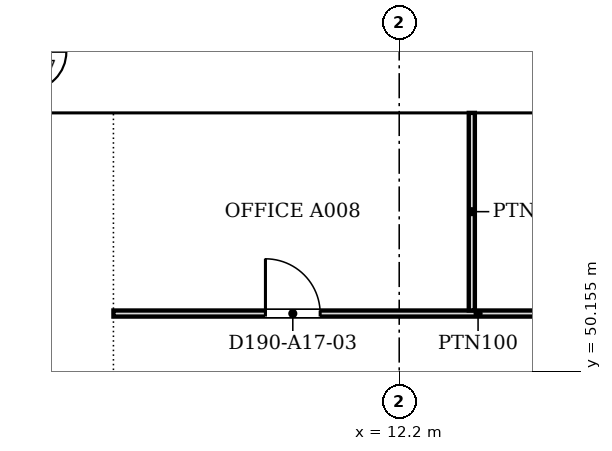
"""IFC4 building model, lengths in metres.
Left out: names, types, materials, properties, quantities, classifications, styles, units other than length and angle.
Written with IfcOpenShell. Run it as: python <this file> out.ifc"""

import sys

from ifc_helpers import new_model, si_unit, direction, frame, frame_2d, origin, place, context, subcontext, project, spatial, polyline, rectangle, outline, extrude, faceted_brep, source, transform, mapped, element, fill, save


model = new_model("IFC4")
c1 = context("Model", 3, precision=1e-05, world=origin(), true_north=direction((0.0, 1.0)))
c2 = subcontext(c1, "Body", "Model", "MODEL_VIEW")
j1 = project(units=[si_unit("LENGTHUNIT", "METRE"), si_unit("PLANEANGLEUNIT", "RADIAN")], contexts=[c1])
p1 = place(None, origin())
s1 = spatial("IfcSite", under=j1, at=p1, CompositionType="ELEMENT")
p2 = place(p1, origin())
s2 = spatial("IfcBuilding", under=s1, at=p2, CompositionType="ELEMENT")
p3 = place(p2, frame((0.0, 0.0, 185.8)))
s3 = spatial("IfcBuildingStorey", under=s2, at=p3, CompositionType="ELEMENT", Elevation=185.8)
m1 = source(origin(), c2, "Body", "SweptSolid", [
    extrude(outline(polyline([(3.05, 0.0), (6.1, 3.8), (3.05, 7.6), (0.0, 3.8), (3.05, 0.0)])), frame((0.0, 0.25, 0.0), z_axis=(0.0, -1.0, 0.0), x_axis=(1.0, 0.0, 0.0)), (0.0, 0.0, 1.0), 0.5),
])
p4 = place(p3, frame((15.25, 54.65, -3.8), z_axis=(0.0, 0.0, 1.0), x_axis=(-1.0, 0.0, 0.0)))
e1 = element("IfcWall", 1, at=p4, inside=s3, PredefinedType="SOLIDWALL", context=c2, shape_type="MappedRepresentation", body=[
    mapped(m1, transform((0.0, 0.0, 0.0), scale=1.0)),
])
m2 = source(origin(), c2, "Body", "SweptSolid", [
    extrude(outline(polyline([(3.05, 0.399), (5.78, 3.8), (3.05, 7.201), (0.321, 3.8), (3.05, 0.399)])), frame((0.0, 0.26, 0.0), z_axis=(0.0, -1.0, 0.0), x_axis=(1.0, 0.0, 0.0)), (0.0, 0.0, 1.0), 0.52),
])
p5 = place(p4, origin())
e2 = element("IfcOpeningElement", 2, at=p5, cuts=e1, PredefinedType="OPENING", context=c2, shape_type="MappedRepresentation", body=[
    mapped(m2, transform((0.0, 0.0, 0.0), scale=1.0)),
])
m3 = source(origin(), c2, "Body", "Brep", [
    faceted_brep([(3.003, -0.25, 0.0), (3.05, -0.25, 0.06), (3.05, -0.25, 7.54), (3.003, -0.25, 7.6), (0.0, -0.25, 3.8), (0.0, 0.25, 3.8), (2.957, 0.25, 7.541), (2.957, 0.25, 0.059), (3.003, 0.0, 0.0), (3.003, 0.0, 7.6)], [[[0, 1, 2, 3, 4]], [[5, 6, 7]], [[1, 0, 8]], [[9, 3, 2]], [[6, 5, 4, 3, 9]], [[5, 7, 8, 0, 4]], [[1, 8, 7, 6, 9, 2]]]),
])
p6 = place(p3, frame((9.15, 54.65, -3.8), z_axis=(0.0, 0.0, 1.0), x_axis=(-1.0, 0.0, 0.0)))
e3 = element("IfcWall", 3, at=p6, inside=s3, PredefinedType="SOLIDWALL", context=c2, shape_type="MappedRepresentation", body=[
    mapped(m3, transform((0.0, 0.0, 0.0), scale=1.0)),
])
m4 = source(origin(), c2, "Body", "SweptSolid", [
    extrude(outline(polyline([(2.803, 6.944), (0.319, 3.8), (2.803, 0.656), (2.803, 6.944)])), frame((0.0, 0.26, 0.0), z_axis=(0.0, -1.0, 0.0), x_axis=(1.0, 0.0, 0.0)), (0.0, 0.0, 1.0), 0.52),
])
p7 = place(p6, origin())
e4 = element("IfcOpeningElement", 4, at=p7, cuts=e3, PredefinedType="OPENING", context=c2, shape_type="MappedRepresentation", body=[
    mapped(m4, transform((0.0, 0.0, 0.0), scale=1.0)),
])
p8 = place(p2, frame((0.0, 0.0, 189.6)))
s4 = spatial("IfcBuildingStorey", under=s2, at=p8, CompositionType="ELEMENT", Elevation=189.6)
m5 = source(origin(), c2, "Body", "SweptSolid", [
    extrude(outline(polyline([(3.05, 0.0), (6.1, 3.8), (3.05, 7.6), (0.0, 3.8), (3.05, 0.0)])), frame((0.0, 0.25, 0.0), z_axis=(0.0, -1.0, 0.0), x_axis=(1.0, 0.0, 0.0)), (0.0, 0.0, 1.0), 0.5),
])
p9 = place(p8, frame((18.3, 54.65, -3.8), z_axis=(0.0, 0.0, 1.0), x_axis=(-1.0, 0.0, 0.0)))
e5 = element("IfcWall", 5, at=p9, inside=s4, PredefinedType="SOLIDWALL", context=c2, shape_type="MappedRepresentation", body=[
    mapped(m5, transform((0.0, 0.0, 0.0), scale=1.0)),
])
m6 = source(origin(), c2, "Body", "SweptSolid", [
    extrude(outline(polyline([(3.05, 0.399), (5.78, 3.8), (3.05, 7.2), (0.321, 3.8), (3.05, 0.399)])), frame((0.0, 0.26, 0.0), z_axis=(0.0, -1.0, 0.0), x_axis=(1.0, 0.0, 0.0)), (0.0, 0.0, 1.0), 0.52),
])
p10 = place(p9, origin())
e6 = element("IfcOpeningElement", 6, at=p10, cuts=e5, PredefinedType="OPENING", context=c2, shape_type="MappedRepresentation", body=[
    mapped(m6, transform((0.0, 0.0, 0.0), scale=1.0)),
])
m7 = source(origin(), c2, "Body", "Brep", [
    faceted_brep([(3.05, -0.25, 0.0), (6.053, -0.25, 3.8), (3.05, -0.25, 7.6), (0.0, -0.25, 3.8), (0.0, 0.25, 3.8), (3.05, 0.25, 7.6), (6.007, 0.25, 3.859), (6.007, 0.25, 3.741), (3.05, 0.25, 0.0), (6.053, 0.0, 3.8)], [[[0, 1, 2, 3]], [[4, 5, 6, 7, 8]], [[8, 7, 9, 1, 0]], [[6, 5, 2, 1, 9]], [[5, 4, 3, 2]], [[4, 8, 0, 3]], [[7, 6, 9]]]),
])
p11 = place(p8, frame((12.2, 54.65, -3.8), z_axis=(0.0, 0.0, 1.0), x_axis=(-1.0, 0.0, 0.0)))
e7 = element("IfcWall", 7, at=p11, inside=s4, PredefinedType="SOLIDWALL", context=c2, shape_type="MappedRepresentation", body=[
    mapped(m7, transform((0.0, 0.0, 0.0), scale=1.0)),
])
m8 = source(origin(), c2, "Body", "SweptSolid", [
    extrude(outline(polyline([(3.049, 0.401), (5.735, 3.8), (3.049, 7.199), (0.321, 3.8), (3.049, 0.401)])), frame((0.0, 0.26, 0.0), z_axis=(0.0, -1.0, 0.0), x_axis=(1.0, 0.0, 0.0)), (0.0, 0.0, 1.0), 0.52),
])
p12 = place(p11, origin())
e8 = element("IfcOpeningElement", 8, at=p12, cuts=e7, PredefinedType="OPENING", context=c2, shape_type="MappedRepresentation", body=[
    mapped(m8, transform((0.0, 0.0, 0.0), scale=1.0)),
])
p13 = place(p3, frame((7.5, 51.1, 0.0), z_axis=(0.0, 0.0, 1.0), x_axis=(1.0, 0.0, 0.0)))
e9 = element("IfcWall", 9, at=p13, inside=s3, PredefinedType="PARTITIONING", context=c2, shape_type="SweptSolid", body=[
    extrude(rectangle(XDim=12.124, YDim=0.1, at=frame_2d((6.062, 0.0))), origin(), (0.0, 0.0, 1.0), 3.067),
])
m9 = source(origin(), c2, "Body", "SweptSolid", [
    extrude(rectangle(XDim=0.9, YDim=2.1, at=frame_2d((0.45, 1.05))), frame((0.0, 0.06, 0.0), z_axis=(0.0, -1.0, 0.0), x_axis=(1.0, 0.0, 0.0)), (0.0, 0.0, 1.0), 0.12),
])
p14 = place(p13, frame((2.5, 0.0, 0.0)))
e10 = element("IfcOpeningElement", 10, at=p14, cuts=e9, PredefinedType="OPENING", context=c2, shape_type="MappedRepresentation", body=[
    mapped(m9, transform((0.0, 0.0, 0.0), scale=1.0)),
])
p15 = place(p13, frame((8.594, 0.0, 0.0)))
e11 = element("IfcOpeningElement", 11, at=p15, cuts=e9, PredefinedType="OPENING", context=c2, shape_type="MappedRepresentation", body=[
    mapped(m9, transform((0.0, 0.0, 0.0), scale=1.0)),
])
p16 = place(p3, frame((13.394, 51.151, 0.0), z_axis=(0.0, 0.0, 1.0), x_axis=(0.0, 1.0, 0.0)))
e12 = element("IfcWall", 12, at=p16, inside=s3, PredefinedType="PARTITIONING", context=c2, shape_type="SweptSolid", body=[
    extrude(rectangle(XDim=3.249, YDim=0.1, at=frame_2d((1.625, 0.0))), origin(), (0.0, 0.0, 1.0), 3.067),
])
m10 = source(origin(), c2, "Body", "SweptSolid", [
    extrude(rectangle(XDim=0.9, YDim=2.1, at=frame_2d((0.45, 1.05))), frame((0.0, 0.025, 0.0), z_axis=(0.0, -1.0, 0.0), x_axis=(1.0, 0.0, 0.0)), (0.0, 0.0, 1.0), 0.05),
])
p17 = place(p14, origin())
e13 = element("IfcDoor", 13, at=p17, inside=s3, OperationType="SINGLE_SWING_LEFT", PredefinedType="DOOR", context=c2, shape_type="MappedRepresentation", body=[
    mapped(m10, transform((0.0, 0.0, 0.0), scale=1.0)),
])
fill(e10, e13)
save(model, sys.argv[1])
